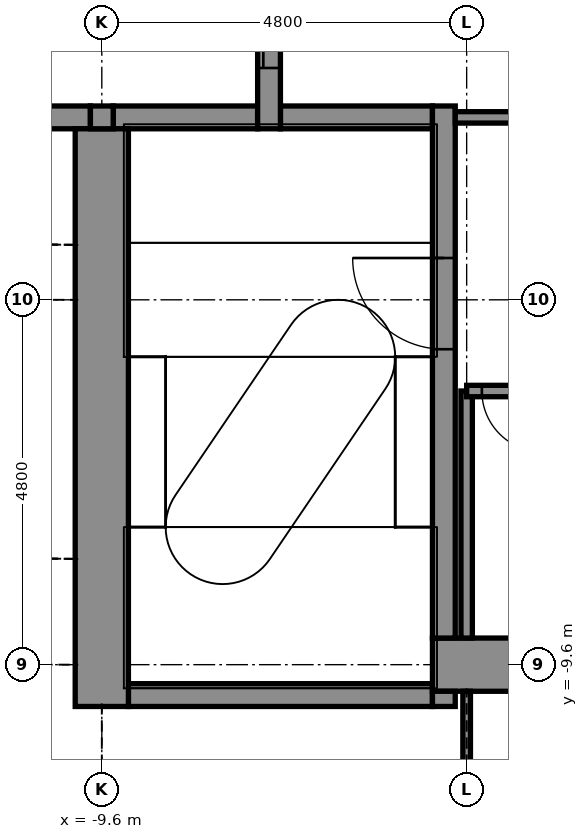
"""IFC4 building model, lengths in metres.
Left out: names, types, materials, properties, quantities, classifications, styles, units other than length and angle.
Written with IfcOpenShell. Run it as: python <this file> out.ifc"""

import sys

from ifc_helpers import new_model, si_unit, direction, frame, frame_2d, origin, place, context, subcontext, project, spatial, rectangle, extrude, element, fill, save


model = new_model("IFC4")
c1 = context("Model", 3, precision=1e-05, world=origin(), true_north=direction((0.0, 1.0)))
c2 = subcontext(c1, "Body", "Model", "MODEL_VIEW")
j1 = project(units=[si_unit("LENGTHUNIT", "METRE"), si_unit("PLANEANGLEUNIT", "RADIAN")], contexts=[c1])
p1 = place(None, origin())
s1 = spatial("IfcSite", under=j1, at=p1, CompositionType="ELEMENT")
p2 = place(p1, origin())
s2 = spatial("IfcBuilding", under=s1, at=p2, CompositionType="ELEMENT")
p3 = place(p2, frame((0.0, 0.0, 216.8)))
s3 = spatial("IfcBuildingStorey", under=s2, at=p3, CompositionType="ELEMENT", Elevation=216.8)
p4 = place(p3, frame((-9.25, -10.0, -0.3), z_axis=(0.0, 0.0, 1.0), x_axis=(1.0, 0.0, 0.0)))
e1 = element("IfcWall", 1, at=p4, inside=s3, PredefinedType="STANDARD", context=c2, shape_type="SweptSolid", body=[
    extrude(rectangle(XDim=4.0, YDim=0.3, at=frame_2d((2.0, 0.0))), origin(), (0.0, 0.0, 1.0), 6.15),
])
p5 = place(p3, frame((-5.25, -9.6, -0.3), z_axis=(0.0, 0.0, 1.0), x_axis=(1.0, 0.0, 0.0)))
e2 = element("IfcWall", 2, at=p5, inside=s3, PredefinedType="SHEAR", context=c2, shape_type="SweptSolid", body=[
    extrude(rectangle(XDim=10.2, YDim=0.7, at=frame_2d((5.1, 0.0))), origin(), (0.0, 0.0, 1.0), 6.15),
])
p6 = place(p5, frame((9.0, 0.0, 0.3)))
e3 = element("IfcOpeningElement", 3, at=p6, cuts=e2, PredefinedType="OPENING", context=c2, shape_type="SweptSolid", body=[
    extrude(rectangle(XDim=0.9, YDim=2.1, at=frame_2d((0.45, 1.05))), frame((0.0, 0.36, 0.0), z_axis=(0.0, -1.0, 0.0), x_axis=(1.0, 0.0, 0.0)), (0.0, 0.0, 1.0), 0.72),
])
p7 = place(p3, frame((-10.85, -2.4, -0.3), z_axis=(0.0, 0.0, 1.0), x_axis=(1.0, 0.0, 0.0)))
e4 = element("IfcWall", 4, at=p7, inside=s3, PredefinedType="STANDARD", context=c2, shape_type="SweptSolid", body=[
    extrude(rectangle(XDim=1.1, YDim=0.3, at=frame_2d((0.55, 0.0))), origin(), (0.0, 0.0, 1.0), 6.15),
])
p8 = place(p3, frame((-9.45, -2.4, -0.3), z_axis=(0.0, 0.0, 1.0), x_axis=(1.0, 0.0, 0.0)))
e5 = element("IfcWall", 5, at=p8, inside=s3, PredefinedType="STANDARD", context=c2, shape_type="SweptSolid", body=[
    extrude(rectangle(XDim=1.9, YDim=0.3, at=frame_2d((0.95, 0.0))), origin(), (0.0, 0.0, 1.0), 6.15),
])
p9 = place(p3, frame((-7.25, -2.4, -0.3), z_axis=(0.0, 0.0, 1.0), x_axis=(1.0, 0.0, 0.0)))
e6 = element("IfcWall", 6, at=p9, inside=s3, PredefinedType="STANDARD", context=c2, shape_type="SweptSolid", body=[
    extrude(rectangle(XDim=2.0, YDim=0.3, at=frame_2d((1.0, 0.0))), origin(), (0.0, 0.0, 1.0), 6.15),
])
p10 = place(p3, frame((-9.6, -10.15, -0.3), z_axis=(0.0, 0.0, 1.0), x_axis=(0.0, 1.0, 0.0)))
e7 = element("IfcWall", 7, at=p10, inside=s3, PredefinedType="SHEAR", context=c2, shape_type="SweptSolid", body=[
    extrude(rectangle(XDim=7.6, YDim=0.7, at=frame_2d((3.8, 0.0))), origin(), (0.0, 0.0, 1.0), 6.15),
])
p11 = place(p3, frame((-9.6, -2.55, -0.3), z_axis=(0.0, 0.0, 1.0), x_axis=(0.0, 1.0, 0.0)))
e8 = element("IfcWall", 8, at=p11, inside=s3, PredefinedType="STANDARD", context=c2, shape_type="SweptSolid", body=[
    extrude(rectangle(XDim=0.3, YDim=0.3, at=frame_2d((0.15, 0.0))), origin(), (0.0, 0.0, 1.0), 6.15),
])
p12 = place(p3, frame((-7.4, -2.55, -0.3), z_axis=(0.0, 0.0, 1.0), x_axis=(0.0, 1.0, 0.0)))
e9 = element("IfcWall", 9, at=p12, inside=s3, PredefinedType="STANDARD", context=c2, shape_type="SweptSolid", body=[
    extrude(rectangle(XDim=5.1, YDim=0.3, at=frame_2d((2.55, 0.0))), origin(), (0.0, 0.0, 1.0), 6.15),
])
p13 = place(p12, frame((0.8, 0.0, 0.3)))
e10 = element("IfcOpeningElement", 10, at=p13, cuts=e9, PredefinedType="OPENING", context=c2, shape_type="SweptSolid", body=[
    extrude(rectangle(XDim=1.1, YDim=2.1, at=frame_2d((0.55, 1.05))), frame((0.0, 0.16, 0.0), z_axis=(0.0, -1.0, 0.0), x_axis=(1.0, 0.0, 0.0)), (0.0, 0.0, 1.0), 0.32),
])
p14 = place(p12, frame((3.2, 0.0, 0.3)))
e11 = element("IfcOpeningElement", 11, at=p14, cuts=e9, PredefinedType="OPENING", context=c2, shape_type="SweptSolid", body=[
    extrude(rectangle(XDim=1.1, YDim=2.1, at=frame_2d((0.55, 1.05))), frame((0.0, 0.16, 0.0), z_axis=(0.0, -1.0, 0.0), x_axis=(1.0, 0.0, 0.0)), (0.0, 0.0, 1.0), 0.32),
])
p15 = place(p3, frame((-5.1, -10.15, -0.3), z_axis=(0.0, 0.0, 1.0), x_axis=(0.0, 1.0, 0.0)))
e12 = element("IfcWall", 12, at=p15, inside=s3, PredefinedType="STANDARD", context=c2, shape_type="SweptSolid", body=[
    extrude(rectangle(XDim=0.2, YDim=0.3, at=frame_2d((0.1, 0.0))), origin(), (0.0, 0.0, 1.0), 6.15),
])
p16 = place(p3, frame((-5.1, -9.25, -0.3), z_axis=(0.0, 0.0, 1.0), x_axis=(0.0, 1.0, 0.0)))
e13 = element("IfcWall", 13, at=p16, inside=s3, PredefinedType="STANDARD", context=c2, shape_type="SweptSolid", body=[
    extrude(rectangle(XDim=7.0, YDim=0.3, at=frame_2d((3.5, 0.0))), origin(), (0.0, 0.0, 1.0), 6.15),
])
p17 = place(p16, frame((3.8, 0.0, 0.3)))
e14 = element("IfcOpeningElement", 14, at=p17, cuts=e13, PredefinedType="OPENING", context=c2, shape_type="SweptSolid", body=[
    extrude(rectangle(XDim=1.2, YDim=2.1, at=frame_2d((0.6, 1.05))), frame((0.0, 0.16, 0.0), z_axis=(0.0, -1.0, 0.0), x_axis=(1.0, 0.0, 0.0)), (0.0, 0.0, 1.0), 0.32),
])
p18 = place(p3, frame((-4.8, -14.8, 0.0), z_axis=(0.0, 0.0, 1.0), x_axis=(0.0, 1.0, 0.0)))
e15 = element("IfcWall", 15, at=p18, inside=s3, PredefinedType="PARTITIONING", context=c2, shape_type="SweptSolid", body=[
    extrude(rectangle(XDim=4.85, YDim=0.1, at=frame_2d((2.425, 0.0))), origin(), (0.0, 0.0, 1.0), 5.54),
])
p19 = place(p3, frame((-4.8, -9.25, 0.0), z_axis=(0.0, 0.0, 1.0), x_axis=(0.0, 1.0, 0.0)))
e16 = element("IfcWall", 16, at=p19, inside=s3, PredefinedType="PARTITIONING", context=c2, shape_type="SweptSolid", body=[
    extrude(rectangle(XDim=3.25, YDim=0.15, at=frame_2d((1.625, 0.0))), origin(), (0.0, 0.0, 1.0), 5.85),
])
p20 = place(p3, frame((-4.8, -6.0, 0.0), z_axis=(0.0, 0.0, 1.0), x_axis=(1.0, 0.0, 0.0)))
e17 = element("IfcWall", 17, at=p20, inside=s3, PredefinedType="PARTITIONING", context=c2, shape_type="SweptSolid", body=[
    extrude(rectangle(XDim=1.05, YDim=0.15, at=frame_2d((0.525, 0.0))), origin(), (0.0, 0.0, 1.0), 5.85),
])
p21 = place(p20, frame((0.2, 0.0, 0.0)))
e18 = element("IfcOpeningElement", 18, at=p21, cuts=e17, PredefinedType="OPENING", context=c2, shape_type="SweptSolid", body=[
    extrude(rectangle(XDim=0.8, YDim=2.1, at=frame_2d((0.4, 1.05))), frame((0.0, 0.085, 0.0), z_axis=(0.0, -1.0, 0.0), x_axis=(1.0, 0.0, 0.0)), (0.0, 0.0, 1.0), 0.17),
])
p22 = place(p3, frame((-4.95, -2.4, 0.0), z_axis=(0.0, 0.0, 1.0), x_axis=(1.0, 0.0, 0.0)))
e19 = element("IfcWall", 19, at=p22, inside=s3, PredefinedType="PARTITIONING", context=c2, shape_type="SweptSolid", body=[
    extrude(rectangle(XDim=1.2, YDim=0.15, at=frame_2d((0.6, 0.0))), origin(), (0.0, 0.0, 1.0), 5.85),
])
p23 = place(p21, frame((0.8, 0.0, 0.0), z_axis=(0.0, 0.0, 1.0), x_axis=(-1.0, 0.0, 0.0)))
e20 = element("IfcDoor", 20, at=p23, inside=s3, OperationType="SINGLE_SWING_RIGHT", PredefinedType="DOOR", context=c2, shape_type="SweptSolid", body=[
    extrude(rectangle(XDim=0.8, YDim=2.1, at=frame_2d((0.4, 1.05))), frame((0.0, 0.025, 0.0), z_axis=(0.0, -1.0, 0.0), x_axis=(1.0, 0.0, 0.0)), (0.0, 0.0, 1.0), 0.05),
])
fill(e18, e20)
p24 = place(p13, origin())
e21 = element("IfcDoor", 21, at=p24, inside=s3, OperationType="DOUBLE_DOOR_SLIDING", PredefinedType="DOOR", context=c2, shape_type="SweptSolid", body=[
    extrude(rectangle(XDim=1.1, YDim=2.1, at=frame_2d((0.55, 1.05))), frame((0.0, 0.025, 0.0), z_axis=(0.0, -1.0, 0.0), x_axis=(1.0, 0.0, 0.0)), (0.0, 0.0, 1.0), 0.05),
])
fill(e10, e21)
p25 = place(p17, origin())
e22 = element("IfcDoor", 22, at=p25, inside=s3, OperationType="SINGLE_SWING_RIGHT", PredefinedType="DOOR", context=c2, shape_type="SweptSolid", body=[
    extrude(rectangle(XDim=1.2, YDim=2.1, at=frame_2d((0.6, 1.05))), frame((0.0, 0.025, 0.0), z_axis=(0.0, -1.0, 0.0), x_axis=(1.0, 0.0, 0.0)), (0.0, 0.0, 1.0), 0.05),
])
fill(e14, e22)
save(model, sys.argv[1])
